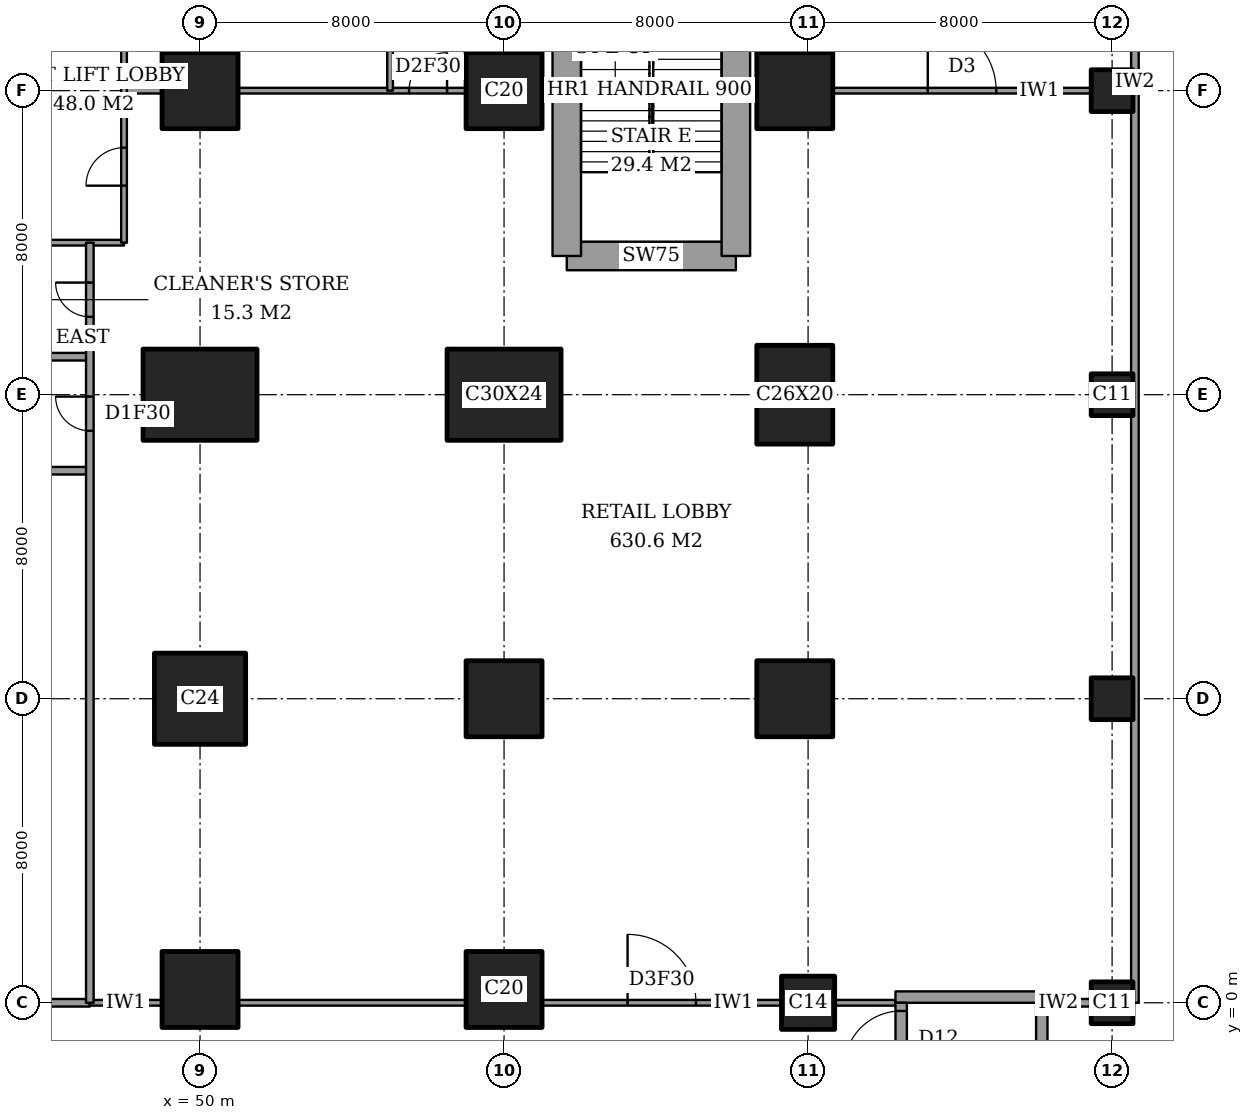
"""IFC4 building model, lengths in metres.
Left out: names, types, materials, properties, quantities, classifications, styles, units other than length and angle.
Written with IfcOpenShell. Run it as: python <this file> out.ifc"""

import sys

from ifc_helpers import new_model, si_unit, direction, frame, frame_2d, origin, origin_2d, place, context, subcontext, project, spatial, rectangle, extrude, element, fill, save


model = new_model("IFC4")
c1 = context("Model", 3, precision=1e-05, world=origin(), true_north=direction((0.0, 1.0)))
c2 = subcontext(c1, "Body", "Model", "MODEL_VIEW")
j1 = project(units=[si_unit("LENGTHUNIT", "METRE"), si_unit("PLANEANGLEUNIT", "RADIAN")], contexts=[c1])
p1 = place(None, origin())
s1 = spatial("IfcSite", under=j1, at=p1, CompositionType="ELEMENT")
p2 = place(p1, origin())
s2 = spatial("IfcBuilding", under=s1, at=p2, CompositionType="ELEMENT")
p3 = place(p2, origin())
s3 = spatial("IfcBuildingStorey", under=s2, at=p3, CompositionType="ELEMENT", Elevation=0.0)
p4 = place(p3, frame((50.0, 0.35, 0.0), z_axis=(0.0, 0.0, 1.0), x_axis=(1.0, 0.0, 0.0)))
e1 = element("IfcColumn", 1, at=p4, inside=s3, PredefinedType="COLUMN", context=c2, shape_type="SweptSolid", body=[
    extrude(rectangle(XDim=2.0, YDim=2.0, at=origin_2d()), origin(), (0.0, 0.0, 1.0), 6.0),
])
p5 = place(p3, frame((50.0, 8.0, 0.0), z_axis=(0.0, 0.0, 1.0), x_axis=(1.0, 0.0, 0.0)))
e2 = element("IfcColumn", 2, at=p5, inside=s3, PredefinedType="COLUMN", context=c2, shape_type="SweptSolid", body=[
    extrude(rectangle(XDim=2.4, YDim=2.4, at=origin_2d()), origin(), (0.0, 0.0, 1.0), 6.0),
])
p6 = place(p3, frame((50.0, 16.0, 0.0), z_axis=(0.0, 0.0, 1.0), x_axis=(1.0, 0.0, 0.0)))
e3 = element("IfcColumn", 3, at=p6, inside=s3, PredefinedType="COLUMN", context=c2, shape_type="SweptSolid", body=[
    extrude(rectangle(XDim=3.0, YDim=2.4, at=origin_2d()), origin(), (0.0, 0.0, 1.0), 6.0),
])
for number, where, z_axis, x_axis in (
    (4, (50.0, 24.0, 0.0), (0.0, 0.0, 1.0), (1.0, 0.0, 0.0)),
    (5, (58.0, 0.35, 0.0), (0.0, 0.0, 1.0), (1.0, 0.0, 0.0)),
    (6, (58.0, 8.0, 0.0), (0.0, 0.0, 1.0), (1.0, 0.0, 0.0)),
):
    element("IfcColumn", number, at=place(p3, frame(where, z_axis=z_axis, x_axis=x_axis)), inside=s3, PredefinedType="COLUMN", context=c2, shape_type="SweptSolid", body=[
        extrude(rectangle(XDim=2.0, YDim=2.0, at=origin_2d()), origin(), (0.0, 0.0, 1.0), 6.0),
    ])
p7 = place(p3, frame((58.0, 16.0, 0.0), z_axis=(0.0, 0.0, 1.0), x_axis=(1.0, 0.0, 0.0)))
e7 = element("IfcColumn", 7, at=p7, inside=s3, PredefinedType="COLUMN", context=c2, shape_type="SweptSolid", body=[
    extrude(rectangle(XDim=3.0, YDim=2.4, at=origin_2d()), origin(), (0.0, 0.0, 1.0), 6.0),
])
p8 = place(p3, frame((58.0, 24.0, 0.0), z_axis=(0.0, 0.0, 1.0), x_axis=(1.0, 0.0, 0.0)))
e8 = element("IfcColumn", 8, at=p8, inside=s3, PredefinedType="COLUMN", context=c2, shape_type="SweptSolid", body=[
    extrude(rectangle(XDim=2.0, YDim=2.0, at=origin_2d()), origin(), (0.0, 0.0, 1.0), 6.0),
])
p9 = place(p3, frame((66.0, 0.0, 0.0), z_axis=(0.0, 0.0, 1.0), x_axis=(1.0, 0.0, 0.0)))
e9 = element("IfcColumn", 9, at=p9, inside=s3, PredefinedType="COLUMN", context=c2, shape_type="SweptSolid", body=[
    extrude(rectangle(XDim=1.4, YDim=1.4, at=origin_2d()), origin(), (0.0, 0.0, 1.0), 6.0),
])
p10 = place(p3, frame((65.65, 8.0, 0.0), z_axis=(0.0, 0.0, 1.0), x_axis=(1.0, 0.0, 0.0)))
e10 = element("IfcColumn", 10, at=p10, inside=s3, PredefinedType="COLUMN", context=c2, shape_type="SweptSolid", body=[
    extrude(rectangle(XDim=2.0, YDim=2.0, at=origin_2d()), origin(), (0.0, 0.0, 1.0), 6.0),
])
p11 = place(p3, frame((65.65, 16.0, 0.0), z_axis=(0.0, 0.0, 1.0), x_axis=(0.0, 1.0, 0.0)))
e11 = element("IfcColumn", 11, at=p11, inside=s3, PredefinedType="COLUMN", context=c2, shape_type="SweptSolid", body=[
    extrude(rectangle(XDim=2.6, YDim=2.0, at=origin_2d()), origin(), (0.0, 0.0, 1.0), 6.0),
])
p12 = place(p3, frame((65.65, 24.0, 0.0), z_axis=(0.0, 0.0, 1.0), x_axis=(1.0, 0.0, 0.0)))
e12 = element("IfcColumn", 12, at=p12, inside=s3, PredefinedType="COLUMN", context=c2, shape_type="SweptSolid", body=[
    extrude(rectangle(XDim=2.0, YDim=2.0, at=origin_2d()), origin(), (0.0, 0.0, 1.0), 6.0),
])
for number, where, z_axis, x_axis in (
    (13, (74.0, 0.0, 0.0), (0.0, 0.0, 1.0), (1.0, 0.0, 0.0)),
    (14, (74.0, 8.0, 0.0), (0.0, 0.0, 1.0), (1.0, 0.0, 0.0)),
    (15, (74.0, 16.0, 0.0), (0.0, 0.0, 1.0), (1.0, 0.0, 0.0)),
    (16, (74.0, 24.0, 0.0), (0.0, 0.0, 1.0), (1.0, 0.0, 0.0)),
):
    element("IfcColumn", number, at=place(p3, frame(where, z_axis=z_axis, x_axis=x_axis)), inside=s3, PredefinedType="COLUMN", context=c2, shape_type="SweptSolid", body=[
        extrude(rectangle(XDim=1.1, YDim=1.1, at=origin_2d()), origin(), (0.0, 0.0, 1.0), 6.0),
    ])
p13 = place(p3, frame((59.65, 19.65, 0.0), z_axis=(0.0, 0.0, 1.0), x_axis=(1.0, 0.0, 0.0)))
e17 = element("IfcWall", 17, at=p13, inside=s3, PredefinedType="SHEAR", context=c2, shape_type="SweptSolid", body=[
    extrude(rectangle(XDim=4.45, YDim=0.75, at=frame_2d((2.225, 0.0))), origin(), (0.0, 0.0, 1.0), 6.0),
])
p14 = place(p3, frame((64.1, 19.65, 0.0), z_axis=(0.0, 0.0, 1.0), x_axis=(0.0, 1.0, 0.0)))
e18 = element("IfcWall", 18, at=p14, inside=s3, PredefinedType="SHEAR", context=c2, shape_type="SweptSolid", body=[
    extrude(rectangle(XDim=8.7, YDim=0.75, at=frame_2d((4.35, 0.0))), origin(), (0.0, 0.0, 1.0), 6.0),
])
p15 = place(p3, frame((59.65, 28.35, 0.0), z_axis=(0.0, 0.0, 1.0), x_axis=(0.0, -1.0, 0.0)))
e19 = element("IfcWall", 19, at=p15, inside=s3, PredefinedType="SHEAR", context=c2, shape_type="SweptSolid", body=[
    extrude(rectangle(XDim=8.7, YDim=0.75, at=frame_2d((4.35, 0.0))), origin(), (0.0, 0.0, 1.0), 6.0),
])
p16 = place(p15, frame((0.425, 0.0, 0.0)))
e20 = element("IfcOpeningElement", 20, at=p16, cuts=e19, PredefinedType="OPENING", context=c2, shape_type="SweptSolid", body=[
    extrude(rectangle(XDim=1.7, YDim=2.1, at=frame_2d((0.85, 1.05))), frame((0.0, 0.385, 0.0), z_axis=(0.0, -1.0, 0.0), x_axis=(1.0, 0.0, 0.0)), (0.0, 0.0, 1.0), 0.77),
])
p17 = place(p3, frame((43.35, 0.0, 0.0), z_axis=(0.0, 0.0, 1.0), x_axis=(1.0, 0.0, 0.0)))
e21 = element("IfcWall", 21, at=p17, inside=s3, PredefinedType="PARTITIONING", context=c2, shape_type="SweptSolid", body=[
    extrude(rectangle(XDim=3.75, YDim=0.2, at=frame_2d((1.875, 0.0))), origin(), (0.0, 0.0, 1.0), 4.3),
])
p18 = place(p3, frame((72.3, 0.0, 0.0), z_axis=(0.0, 0.0, 1.0), x_axis=(1.0, 0.0, 0.0)))
e22 = element("IfcWall", 22, at=p18, inside=s3, PredefinedType="PARTITIONING", context=c2, shape_type="SweptSolid", body=[
    extrude(rectangle(XDim=1.15, YDim=0.2, at=frame_2d((0.575, 0.0))), origin(), (0.0, 0.0, 1.0), 5.7),
])
p19 = place(p3, frame((47.1, 0.0, 0.0), z_axis=(0.0, 0.0, 1.0), x_axis=(1.0, 0.0, 0.0)))
e23 = element("IfcWall", 23, at=p19, inside=s3, PredefinedType="PARTITIONING", context=c2, shape_type="SweptSolid", body=[
    extrude(rectangle(XDim=1.9, YDim=0.15, at=frame_2d((0.95, 0.0))), origin(), (0.0, 0.0, 1.0), 4.3),
])
p20 = place(p3, frame((51.0, 0.0, 0.0), z_axis=(0.0, 0.0, 1.0), x_axis=(1.0, 0.0, 0.0)))
e24 = element("IfcWall", 24, at=p20, inside=s3, PredefinedType="PARTITIONING", context=c2, shape_type="SweptSolid", body=[
    extrude(rectangle(XDim=6.0, YDim=0.15, at=frame_2d((3.0, 0.0))), origin(), (0.0, 0.0, 1.0), 4.3),
])
p21 = place(p3, frame((59.0, 0.0, 0.0), z_axis=(0.0, 0.0, 1.0), x_axis=(1.0, 0.0, 0.0)))
e25 = element("IfcWall", 25, at=p21, inside=s3, PredefinedType="PARTITIONING", context=c2, shape_type="SweptSolid", body=[
    extrude(rectangle(XDim=6.3, YDim=0.15, at=frame_2d((3.15, 0.0))), origin(), (0.0, 0.0, 1.0), 4.3),
])
p22 = place(p21, frame((2.25, 0.0, 0.0)))
e26 = element("IfcOpeningElement", 26, at=p22, cuts=e25, PredefinedType="OPENING", context=c2, shape_type="SweptSolid", body=[
    extrude(rectangle(XDim=1.8, YDim=2.1, at=frame_2d((0.9, 1.05))), frame((0.0, 0.085, 0.0), z_axis=(0.0, -1.0, 0.0), x_axis=(1.0, 0.0, 0.0)), (0.0, 0.0, 1.0), 0.17),
])
p23 = place(p3, frame((66.7, 0.0, 0.0), z_axis=(0.0, 0.0, 1.0), x_axis=(1.0, 0.0, 0.0)))
e27 = element("IfcWall", 27, at=p23, inside=s3, PredefinedType="PARTITIONING", context=c2, shape_type="SweptSolid", body=[
    extrude(rectangle(XDim=1.6, YDim=0.15, at=frame_2d((0.8, 0.0))), origin(), (0.0, 0.0, 1.0), 5.7),
])
for number, where, z_axis, x_axis in (
    (28, (42.0, 14.0, 0.0), (0.0, 0.0, 1.0), (1.0, 0.0, 0.0)),
    (29, (42.0, 17.0, 0.0), (0.0, 0.0, 1.0), (1.0, 0.0, 0.0)),
):
    element("IfcWall", number, at=place(p3, frame(where, z_axis=z_axis, x_axis=x_axis)), inside=s3, PredefinedType="PARTITIONING", context=c2, shape_type="SweptSolid", body=[
        extrude(rectangle(XDim=5.1, YDim=0.2, at=frame_2d((2.55, 0.0))), origin(), (0.0, 0.0, 1.0), 5.7),
    ])
p24 = place(p3, frame((42.0, 20.0, 0.0), z_axis=(0.0, 0.0, 1.0), x_axis=(1.0, 0.0, 0.0)))
e30 = element("IfcWall", 30, at=p24, inside=s3, PredefinedType="PARTITIONING", context=c2, shape_type="SweptSolid", body=[
    extrude(rectangle(XDim=6.0, YDim=0.15, at=frame_2d((3.0, 0.0))), origin(), (0.0, 0.0, 1.0), 5.7),
])
p25 = place(p3, frame((48.0, 24.0, 0.0), z_axis=(0.0, 0.0, 1.0), x_axis=(1.0, 0.0, 0.0)))
e31 = element("IfcWall", 31, at=p25, inside=s3, PredefinedType="PARTITIONING", context=c2, shape_type="SweptSolid", body=[
    extrude(rectangle(XDim=1.0, YDim=0.15, at=frame_2d((0.5, 0.0))), origin(), (0.0, 0.0, 1.0), 5.7),
])
p26 = place(p3, frame((51.0, 24.0, 0.0), z_axis=(0.0, 0.0, 1.0), x_axis=(1.0, 0.0, 0.0)))
e32 = element("IfcWall", 32, at=p26, inside=s3, PredefinedType="PARTITIONING", context=c2, shape_type="SweptSolid", body=[
    extrude(rectangle(XDim=6.0, YDim=0.15, at=frame_2d((3.0, 0.0))), origin(), (0.0, 0.0, 1.0), 4.3),
])
p27 = place(p26, frame((4.5, 0.0, 0.0)))
e33 = element("IfcOpeningElement", 33, at=p27, cuts=e32, PredefinedType="OPENING", context=c2, shape_type="SweptSolid", body=[
    extrude(rectangle(XDim=1.0, YDim=2.1, at=frame_2d((0.5, 1.05))), frame((0.0, 0.085, 0.0), z_axis=(0.0, -1.0, 0.0), x_axis=(1.0, 0.0, 0.0)), (0.0, 0.0, 1.0), 0.17),
])
p28 = place(p3, frame((66.65, 24.0, 0.0), z_axis=(0.0, 0.0, 1.0), x_axis=(1.0, 0.0, 0.0)))
e34 = element("IfcWall", 34, at=p28, inside=s3, PredefinedType="PARTITIONING", context=c2, shape_type="SweptSolid", body=[
    extrude(rectangle(XDim=6.8, YDim=0.15, at=frame_2d((3.4, 0.0))), origin(), (0.0, 0.0, 1.0), 4.3),
])
p29 = place(p28, frame((2.5, 0.0, 0.0)))
e35 = element("IfcOpeningElement", 35, at=p29, cuts=e34, PredefinedType="OPENING", context=c2, shape_type="SweptSolid", body=[
    extrude(rectangle(XDim=1.8, YDim=2.1, at=frame_2d((0.9, 1.05))), frame((0.0, 0.085, 0.0), z_axis=(0.0, -1.0, 0.0), x_axis=(1.0, 0.0, 0.0)), (0.0, 0.0, 1.0), 0.17),
])
p30 = place(p3, frame((47.1, 0.0, 0.0), z_axis=(0.0, 0.0, 1.0), x_axis=(0.0, 1.0, 0.0)))
e36 = element("IfcWall", 36, at=p30, inside=s3, PredefinedType="PARTITIONING", context=c2, shape_type="SweptSolid", body=[
    extrude(rectangle(XDim=20.0, YDim=0.2, at=frame_2d((10.0, 0.0))), origin(), (0.0, 0.0, 1.0), 5.7),
])
p31 = place(p30, frame((15.05, 0.0, 0.0)))
e37 = element("IfcOpeningElement", 37, at=p31, cuts=e36, PredefinedType="OPENING", context=c2, shape_type="SweptSolid", body=[
    extrude(rectangle(XDim=0.9, YDim=2.1, at=frame_2d((0.45, 1.05))), frame((0.0, 0.11, 0.0), z_axis=(0.0, -1.0, 0.0), x_axis=(1.0, 0.0, 0.0)), (0.0, 0.0, 1.0), 0.22),
])
p32 = place(p30, frame((18.05, 0.0, 0.0)))
e38 = element("IfcOpeningElement", 38, at=p32, cuts=e36, PredefinedType="OPENING", context=c2, shape_type="SweptSolid", body=[
    extrude(rectangle(XDim=0.9, YDim=2.1, at=frame_2d((0.45, 1.05))), frame((0.0, 0.11, 0.0), z_axis=(0.0, -1.0, 0.0), x_axis=(1.0, 0.0, 0.0)), (0.0, 0.0, 1.0), 0.22),
])
p33 = place(p3, frame((48.0, 20.0, 0.0), z_axis=(0.0, 0.0, 1.0), x_axis=(0.0, 1.0, 0.0)))
e39 = element("IfcWall", 39, at=p33, inside=s3, PredefinedType="PARTITIONING", context=c2, shape_type="SweptSolid", body=[
    extrude(rectangle(XDim=8.0, YDim=0.15, at=frame_2d((4.0, 0.0))), origin(), (0.0, 0.0, 1.0), 5.7),
])
p34 = place(p33, frame((1.5, 0.0, 0.0)))
e40 = element("IfcOpeningElement", 40, at=p34, cuts=e39, PredefinedType="OPENING", context=c2, shape_type="SweptSolid", body=[
    extrude(rectangle(XDim=1.0, YDim=2.1, at=frame_2d((0.5, 1.05))), frame((0.0, 0.085, 0.0), z_axis=(0.0, -1.0, 0.0), x_axis=(1.0, 0.0, 0.0)), (0.0, 0.0, 1.0), 0.17),
])
p35 = place(p3, frame((55.0, 24.0, 0.0), z_axis=(0.0, 0.0, 1.0), x_axis=(0.0, 1.0, 0.0)))
e41 = element("IfcWall", 41, at=p35, inside=s3, PredefinedType="PARTITIONING", context=c2, shape_type="SweptSolid", body=[
    extrude(rectangle(XDim=4.725, YDim=0.15, at=frame_2d((2.363, 0.0))), origin(), (0.0, 0.0, 1.0), 5.7),
])
p36 = place(p3, frame((74.6, 0.0, 0.0), z_axis=(0.0, 0.0, 1.0), x_axis=(0.0, 1.0, 0.0)))
e42 = element("IfcWall", 42, at=p36, inside=s3, PredefinedType="PARTITIONING", context=c2, shape_type="SweptSolid", body=[
    extrude(rectangle(XDim=48.45, YDim=0.2, at=frame_2d((24.225, 0.0))), origin(), (0.0, 0.0, 1.0), 5.7),
])
p37 = place(p3, frame((68.3, 0.15, 0.0), z_axis=(0.0, 0.0, 1.0), x_axis=(1.0, 0.0, 0.0)))
e43 = element("IfcWall", 43, at=p37, inside=s3, PredefinedType="PARTITIONING", context=c2, shape_type="SweptSolid", body=[
    extrude(rectangle(XDim=4.0, YDim=0.3, at=frame_2d((2.0, 0.0))), origin(), (0.0, 0.0, 1.0), 6.0),
])
p38 = place(p3, frame((68.45, -7.9, 0.0), z_axis=(0.0, 0.0, 1.0), x_axis=(0.0, 1.0, 0.0)))
e44 = element("IfcWall", 44, at=p38, inside=s3, PredefinedType="PARTITIONING", context=c2, shape_type="SweptSolid", body=[
    extrude(rectangle(XDim=7.9, YDim=0.3, at=frame_2d((3.95, 0.0))), origin(), (0.0, 0.0, 1.0), 6.0),
])
p39 = place(p38, frame((6.185, 0.0, 0.0)))
e45 = element("IfcOpeningElement", 45, at=p39, cuts=e44, PredefinedType="OPENING", context=c2, shape_type="SweptSolid", body=[
    extrude(rectangle(XDim=1.5, YDim=2.1, at=frame_2d((0.75, 1.05))), frame((0.0, 0.16, 0.0), z_axis=(0.0, -1.0, 0.0), x_axis=(1.0, 0.0, 0.0)), (0.0, 0.0, 1.0), 0.32),
])
p40 = place(p3, frame((72.15, -7.9, 0.0), z_axis=(0.0, 0.0, 1.0), x_axis=(0.0, 1.0, 0.0)))
e46 = element("IfcWall", 46, at=p40, inside=s3, PredefinedType="PARTITIONING", context=c2, shape_type="SweptSolid", body=[
    extrude(rectangle(XDim=7.9, YDim=0.3, at=frame_2d((3.95, 0.0))), origin(), (0.0, 0.0, 1.0), 6.0),
])
p41 = place(p34, origin())
e47 = element("IfcDoor", 47, at=p41, inside=s3, OperationType="SINGLE_SWING_RIGHT", PredefinedType="DOOR", context=c2, shape_type="SweptSolid", body=[
    extrude(rectangle(XDim=1.0, YDim=2.1, at=frame_2d((0.5, 1.05))), frame((0.0, 0.025, 0.0), z_axis=(0.0, -1.0, 0.0), x_axis=(1.0, 0.0, 0.0)), (0.0, 0.0, 1.0), 0.05),
])
fill(e40, e47)
p42 = place(p22, origin())
e48 = element("IfcDoor", 48, at=p42, inside=s3, OperationType="DOUBLE_DOOR_DOUBLE_SWING", PredefinedType="DOOR", context=c2, shape_type="SweptSolid", body=[
    extrude(rectangle(XDim=1.8, YDim=2.1, at=frame_2d((0.9, 1.05))), frame((0.0, 0.025, 0.0), z_axis=(0.0, -1.0, 0.0), x_axis=(1.0, 0.0, 0.0)), (0.0, 0.0, 1.0), 0.05),
])
fill(e26, e48)
p43 = place(p27, origin())
e49 = element("IfcDoor", 49, at=p43, inside=s3, OperationType="SINGLE_SWING_LEFT", PredefinedType="DOOR", context=c2, shape_type="SweptSolid", body=[
    extrude(rectangle(XDim=1.0, YDim=2.1, at=frame_2d((0.5, 1.05))), frame((0.0, 0.025, 0.0), z_axis=(0.0, -1.0, 0.0), x_axis=(1.0, 0.0, 0.0)), (0.0, 0.0, 1.0), 0.05),
])
fill(e33, e49)
p44 = place(p29, origin())
e50 = element("IfcDoor", 50, at=p44, inside=s3, OperationType="DOUBLE_DOOR_DOUBLE_SWING", PredefinedType="DOOR", context=c2, shape_type="SweptSolid", body=[
    extrude(rectangle(XDim=1.8, YDim=2.1, at=frame_2d((0.9, 1.05))), frame((0.0, 0.025, 0.0), z_axis=(0.0, -1.0, 0.0), x_axis=(1.0, 0.0, 0.0)), (0.0, 0.0, 1.0), 0.05),
])
fill(e35, e50)
p45 = place(p31, origin())
e51 = element("IfcDoor", 51, at=p45, inside=s3, OperationType="SINGLE_SWING_LEFT", PredefinedType="DOOR", context=c2, shape_type="SweptSolid", body=[
    extrude(rectangle(XDim=0.9, YDim=2.1, at=frame_2d((0.45, 1.05))), frame((0.0, 0.025, 0.0), z_axis=(0.0, -1.0, 0.0), x_axis=(1.0, 0.0, 0.0)), (0.0, 0.0, 1.0), 0.05),
])
fill(e37, e51)
p46 = place(p32, origin())
e52 = element("IfcDoor", 52, at=p46, inside=s3, OperationType="SINGLE_SWING_LEFT", PredefinedType="DOOR", context=c2, shape_type="SweptSolid", body=[
    extrude(rectangle(XDim=0.9, YDim=2.1, at=frame_2d((0.45, 1.05))), frame((0.0, 0.025, 0.0), z_axis=(0.0, -1.0, 0.0), x_axis=(1.0, 0.0, 0.0)), (0.0, 0.0, 1.0), 0.05),
])
fill(e38, e52)
p47 = place(p39, origin())
e53 = element("IfcDoor", 53, at=p47, inside=s3, OperationType="DOUBLE_DOOR_SINGLE_SWING", PredefinedType="DOOR", context=c2, shape_type="SweptSolid", body=[
    extrude(rectangle(XDim=1.5, YDim=2.1, at=frame_2d((0.75, 1.05))), frame((0.0, 0.025, 0.0), z_axis=(0.0, -1.0, 0.0), x_axis=(1.0, 0.0, 0.0)), (0.0, 0.0, 1.0), 0.05),
])
fill(e45, e53)
save(model, sys.argv[1])
